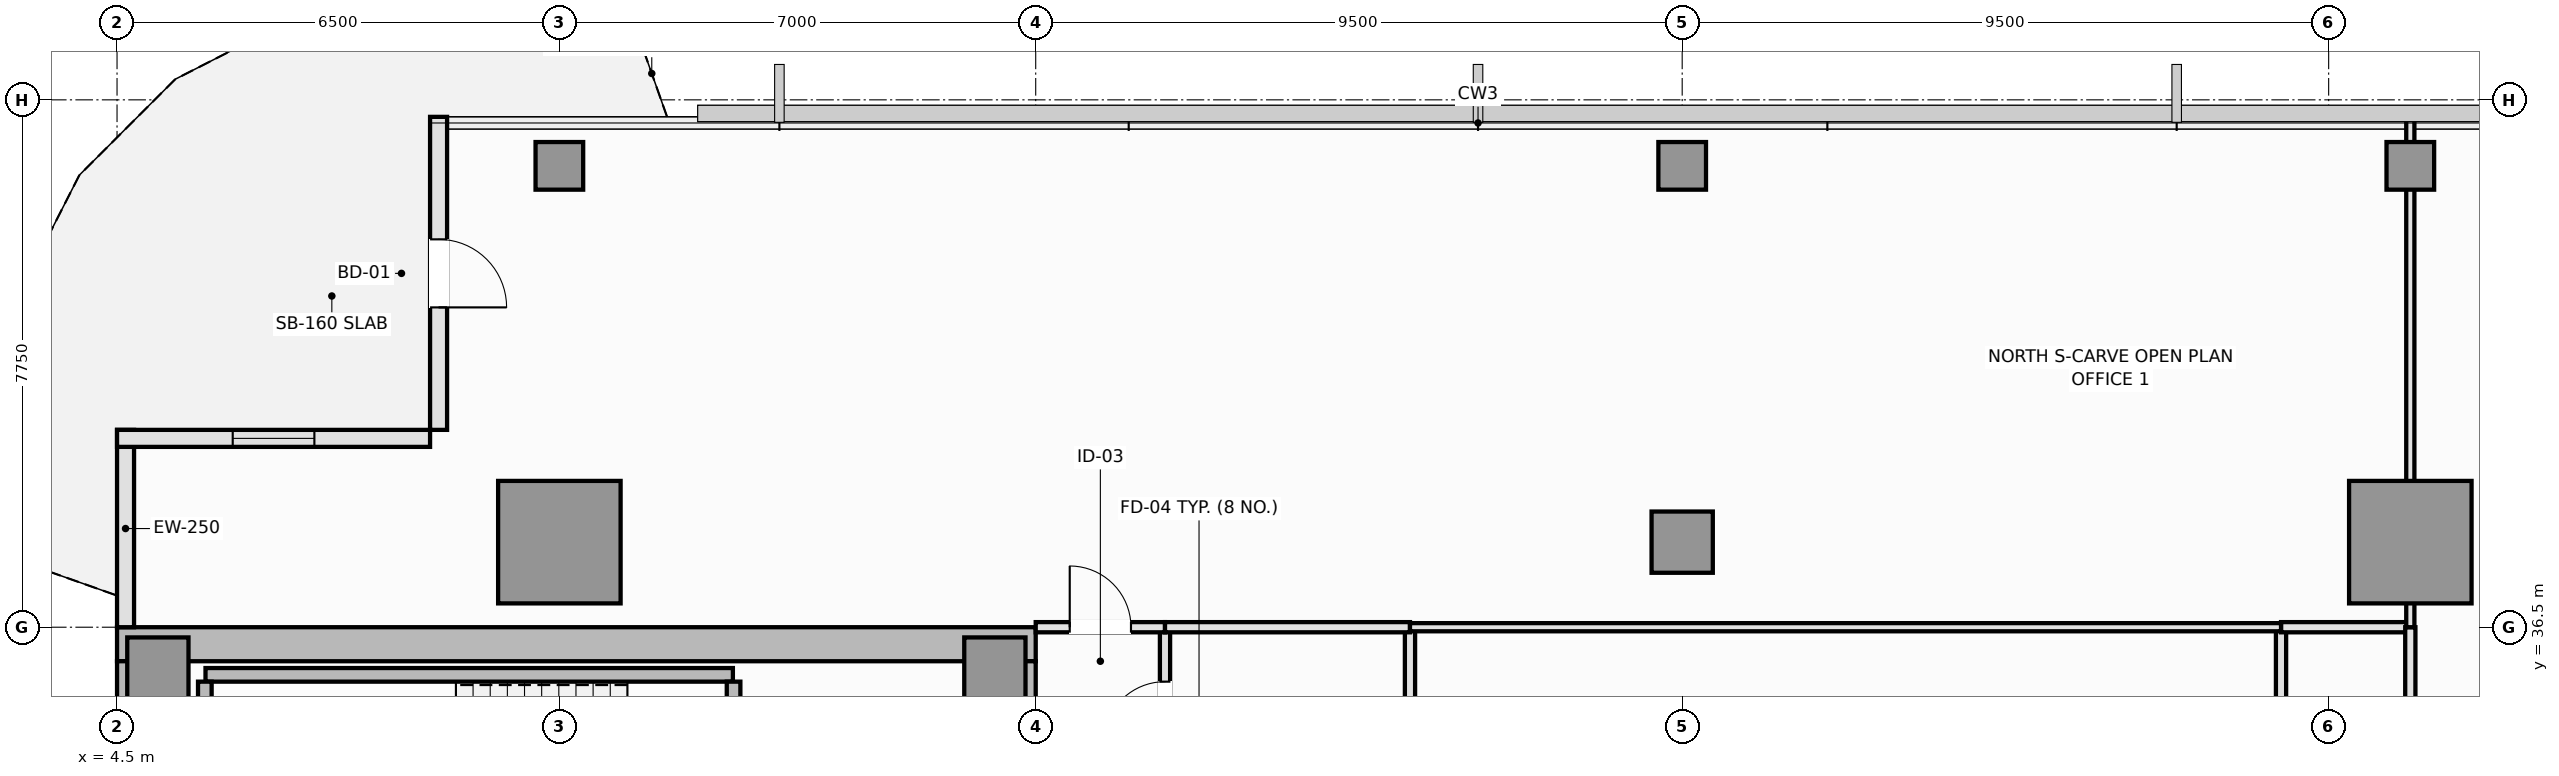
"""IFC4 building model, lengths in metres.
Left out: names, types, materials, properties, quantities, classifications, styles, units other than length and angle.
Written with IfcOpenShell. Run it as: python <this file> out.ifc"""

import sys

from ifc_helpers import new_model, si_unit, direction, frame, frame_2d, origin, origin_2d, place, context, subcontext, project, spatial, rectangle, extrude, element, fill, save


model = new_model("IFC4")
c1 = context("Model", 3, precision=1e-05, world=origin(), true_north=direction((0.0, 1.0)))
c2 = subcontext(c1, "Body", "Model", "MODEL_VIEW")
j1 = project(units=[si_unit("LENGTHUNIT", "METRE"), si_unit("PLANEANGLEUNIT", "RADIAN")], contexts=[c1])
p1 = place(None, origin())
s1 = spatial("IfcSite", under=j1, at=p1, CompositionType="ELEMENT")
p2 = place(p1, origin())
s2 = spatial("IfcBuilding", under=s1, at=p2, CompositionType="ELEMENT")
p3 = place(p2, frame((0.0, 0.0, 270.55)))
s3 = spatial("IfcBuildingStorey", under=s2, at=p3, CompositionType="ELEMENT", Elevation=270.55)
p4 = place(p3, frame((4.5, 36.25, 0.0), z_axis=(0.0, 0.0, 1.0), x_axis=(1.0, 0.0, 0.0)))
e1 = element("IfcWall", 1, at=p4, inside=s3, PredefinedType="SHEAR", context=c2, shape_type="SweptSolid", body=[
    extrude(rectangle(XDim=13.5, YDim=0.5, at=frame_2d((6.75, 0.0))), origin(), (0.0, 0.0, 1.0), 3.55),
])
p5 = place(p3, frame((4.75, 14.5, 0.0), z_axis=(0.0, 0.0, 1.0), x_axis=(0.0, 1.0, 0.0)))
e2 = element("IfcWall", 2, at=p5, inside=s3, PredefinedType="SHEAR", context=c2, shape_type="SweptSolid", body=[
    extrude(rectangle(XDim=21.5, YDim=0.5, at=frame_2d((10.75, 0.0))), origin(), (0.0, 0.0, 1.0), 3.55),
])
p6 = place(p3, frame((17.75, 27.05, 0.0), z_axis=(0.0, 0.0, 1.0), x_axis=(0.0, 1.0, 0.0)))
e3 = element("IfcWall", 3, at=p6, inside=s3, PredefinedType="SHEAR", context=c2, shape_type="SweptSolid", body=[
    extrude(rectangle(XDim=8.95, YDim=0.5, at=frame_2d((4.475, 0.0))), origin(), (0.0, 0.0, 1.0), 3.55),
])
p7 = place(p6, frame((3.45, 0.0, 0.0)))
e4 = element("IfcOpeningElement", 4, at=p7, cuts=e3, PredefinedType="OPENING", context=c2, shape_type="SweptSolid", body=[
    extrude(rectangle(XDim=1.1, YDim=2.15, at=frame_2d((0.55, 1.075))), frame((0.0, 0.26, 0.0), z_axis=(0.0, -1.0, 0.0), x_axis=(1.0, 0.0, 0.0)), (0.0, 0.0, 1.0), 0.52),
])
for number, where, z_axis, x_axis in (
    (5, (5.1, 35.9, 0.0), (0.0, 0.0, 1.0), (1.0, 0.0, 0.0)),
    (6, (17.4, 35.9, 0.0), (0.0, 0.0, 1.0), (1.0, 0.0, 0.0)),
):
    element("IfcColumn", number, at=place(p3, frame(where, z_axis=z_axis, x_axis=x_axis)), inside=s3, PredefinedType="PILASTER", context=c2, shape_type="SweptSolid", body=[
        extrude(rectangle(XDim=0.9, YDim=0.9, at=origin_2d()), origin(), (0.0, 0.0, 1.0), 3.55),
    ])
for number, where, z_axis, x_axis in (
    (7, (11.0, 37.75, 0.0), (0.0, 0.0, 1.0), (1.0, 0.0, 0.0)),
    (8, (38.2, 37.75, 0.0), (0.0, 0.0, 1.0), (1.0, 0.0, 0.0)),
):
    element("IfcColumn", number, at=place(p3, frame(where, z_axis=z_axis, x_axis=x_axis)), inside=s3, PredefinedType="COLUMN", context=c2, shape_type="SweptSolid", body=[
        extrude(rectangle(XDim=1.8, YDim=1.8, at=origin_2d()), origin(), (0.0, 0.0, 1.0), 3.55),
    ])
p8 = place(p3, frame((27.5, 37.75, 0.0), z_axis=(0.0, 0.0, 1.0), x_axis=(1.0, 0.0, 0.0)))
e9 = element("IfcColumn", 9, at=p8, inside=s3, PredefinedType="COLUMN", context=c2, shape_type="SweptSolid", body=[
    extrude(rectangle(XDim=0.9, YDim=0.9, at=origin_2d()), origin(), (0.0, 0.0, 1.0), 3.55),
])
for number, where, z_axis, x_axis in (
    (10, (11.0, 43.28, 0.0), (0.0, 0.0, 1.0), (1.0, 0.0, 0.0)),
    (11, (27.5, 43.28, 0.0), (0.0, 0.0, 1.0), (1.0, 0.0, 0.0)),
    (12, (38.2, 43.28, 0.0), (0.0, 0.0, 1.0), (1.0, 0.0, 0.0)),
):
    element("IfcColumn", number, at=place(p3, frame(where, z_axis=z_axis, x_axis=x_axis)), inside=s3, PredefinedType="COLUMN", context=c2, shape_type="SweptSolid", body=[
        extrude(rectangle(XDim=0.7, YDim=0.7, at=origin_2d()), origin(), (0.0, 0.0, 1.0), 3.55),
    ])
p9 = place(p3, frame((4.625, 39.4, 0.0), z_axis=(0.0, 0.0, 1.0), x_axis=(0.0, -1.0, 0.0)))
e13 = element("IfcWall", 13, at=p9, inside=s3, PredefinedType="SOLIDWALL", context=c2, shape_type="SweptSolid", body=[
    extrude(rectangle(XDim=2.9, YDim=0.25, at=frame_2d((1.45, 0.0))), origin(), (0.0, 0.0, 1.0), 3.39),
])
p10 = place(p3, frame((9.225, 44.0, 0.0), z_axis=(0.0, 0.0, 1.0), x_axis=(0.0, -1.0, 0.0)))
e14 = element("IfcWall", 14, at=p10, inside=s3, PredefinedType="SOLIDWALL", context=c2, shape_type="SweptSolid", body=[
    extrude(rectangle(XDim=4.6, YDim=0.25, at=frame_2d((2.3, 0.0))), origin(), (0.0, 0.0, 1.0), 3.39),
])
p11 = place(p10, frame((1.8, 0.0, 0.0)))
e15 = element("IfcOpeningElement", 15, at=p11, cuts=e14, PredefinedType="OPENING", context=c2, shape_type="SweptSolid", body=[
    extrude(rectangle(XDim=1.0, YDim=2.2, at=frame_2d((0.5, 1.1))), frame((0.0, 0.135, 0.0), z_axis=(0.0, -1.0, 0.0), x_axis=(1.0, 0.0, 0.0)), (0.0, 0.0, 1.0), 0.27),
])
p12 = place(p3, frame((9.1, 39.275, 0.0), z_axis=(0.0, 0.0, 1.0), x_axis=(-1.0, 0.0, 0.0)))
e16 = element("IfcWall", 16, at=p12, inside=s3, PredefinedType="SOLIDWALL", context=c2, shape_type="SweptSolid", body=[
    extrude(rectangle(XDim=4.6, YDim=0.25, at=frame_2d((2.3, 0.0))), origin(), (0.0, 0.0, 1.0), 3.12),
])
p13 = place(p12, frame((1.7, 0.0, 0.9)))
e17 = element("IfcOpeningElement", 17, at=p13, cuts=e16, PredefinedType="OPENING", context=c2, shape_type="SweptSolid", body=[
    extrude(rectangle(XDim=1.2, YDim=1.8, at=frame_2d((0.6, 0.9))), frame((0.0, 0.135, 0.0), z_axis=(0.0, -1.0, 0.0), x_axis=(1.0, 0.0, 0.0)), (0.0, 0.0, 1.0), 0.27),
])
p14 = place(p3, frame((5.8, 35.8, 0.0), z_axis=(0.0, 0.0, 1.0), x_axis=(1.0, 0.0, 0.0)))
e18 = element("IfcWall", 18, at=p14, inside=s3, PredefinedType="SOLIDWALL", context=c2, shape_type="SweptSolid", body=[
    extrude(rectangle(XDim=7.75, YDim=0.2, at=frame_2d((3.875, 0.0))), origin(), (0.0, 0.0, 1.0), 3.55),
])
p15 = place(p3, frame((5.79, 32.65, 0.0), z_axis=(0.0, 0.0, 1.0), x_axis=(0.0, 1.0, 0.0)))
e19 = element("IfcWall", 19, at=p15, inside=s3, PredefinedType="SOLIDWALL", context=c2, shape_type="SweptSolid", body=[
    extrude(rectangle(XDim=3.05, YDim=0.2, at=frame_2d((1.525, 0.0))), origin(), (0.0, 0.0, 1.0), 3.55),
])
p16 = place(p3, frame((13.56, 32.65, 0.0), z_axis=(0.0, 0.0, 1.0), x_axis=(0.0, 1.0, 0.0)))
e20 = element("IfcWall", 20, at=p16, inside=s3, PredefinedType="SOLIDWALL", context=c2, shape_type="SweptSolid", body=[
    extrude(rectangle(XDim=3.05, YDim=0.2, at=frame_2d((1.525, 0.0))), origin(), (0.0, 0.0, 1.0), 3.55),
])
p17 = place(p16, frame((0.95, 0.0, 0.0)))
e21 = element("IfcOpeningElement", 21, at=p17, cuts=e20, PredefinedType="OPENING", context=c2, shape_type="SweptSolid", body=[
    extrude(rectangle(XDim=1.15, YDim=2.15, at=frame_2d((0.575, 1.075))), frame((0.0, 0.11, 0.0), z_axis=(0.0, -1.0, 0.0), x_axis=(1.0, 0.0, 0.0)), (0.0, 0.0, 1.0), 0.22),
])
p18 = place(p3, frame((19.9, 34.0, 0.0), z_axis=(0.0, 0.0, 1.0), x_axis=(0.0, 1.0, 0.0)))
e22 = element("IfcWall", 22, at=p18, inside=s3, PredefinedType="PLUMBINGWALL", context=c2, shape_type="SweptSolid", body=[
    extrude(rectangle(XDim=2.5, YDim=0.15, at=frame_2d((1.25, 0.0))), origin(), (0.0, 0.0, 1.0), 3.39),
])
p19 = place(p18, frame((0.8, 0.0, 0.0)))
e23 = element("IfcOpeningElement", 23, at=p19, cuts=e22, PredefinedType="OPENING", context=c2, shape_type="SweptSolid", body=[
    extrude(rectangle(XDim=0.9, YDim=2.1, at=frame_2d((0.45, 1.05))), frame((0.0, 0.085, 0.0), z_axis=(0.0, -1.0, 0.0), x_axis=(1.0, 0.0, 0.0)), (0.0, 0.0, 1.0), 0.17),
])
p20 = place(p3, frame((18.0, 36.5, 0.0), z_axis=(0.0, 0.0, 1.0), x_axis=(1.0, 0.0, 0.0)))
e24 = element("IfcWall", 24, at=p20, inside=s3, PredefinedType="PARTITIONING", context=c2, shape_type="SweptSolid", body=[
    extrude(rectangle(XDim=1.9, YDim=0.15, at=frame_2d((0.95, 0.0))), origin(), (0.0, 0.0, 1.0), 3.39),
])
p21 = place(p20, frame((0.5, 0.0, 0.0)))
e25 = element("IfcOpeningElement", 25, at=p21, cuts=e24, PredefinedType="OPENING", context=c2, shape_type="SweptSolid", body=[
    extrude(rectangle(XDim=0.9, YDim=2.1, at=frame_2d((0.45, 1.05))), frame((0.0, 0.085, 0.0), z_axis=(0.0, -1.0, 0.0), x_axis=(1.0, 0.0, 0.0)), (0.0, 0.0, 1.0), 0.17),
])
p22 = place(p3, frame((36.3, 32.7, 0.0), z_axis=(0.0, 0.0, 1.0), x_axis=(0.0, 1.0, 0.0)))
e26 = element("IfcWall", 26, at=p22, inside=s3, PredefinedType="PARTITIONING", context=c2, shape_type="SweptSolid", body=[
    extrude(rectangle(XDim=3.8, YDim=0.15, at=frame_2d((1.9, 0.0))), origin(), (0.0, 0.0, 1.0), 3.39),
])
p23 = place(p22, frame((1.4, 0.0, 0.0)))
e27 = element("IfcOpeningElement", 27, at=p23, cuts=e26, PredefinedType="OPENING", context=c2, shape_type="SweptSolid", body=[
    extrude(rectangle(XDim=1.0, YDim=2.15, at=frame_2d((0.5, 1.075))), frame((0.0, 0.085, 0.0), z_axis=(0.0, -1.0, 0.0), x_axis=(1.0, 0.0, 0.0)), (0.0, 0.0, 1.0), 0.17),
])
p24 = place(p3, frame((36.3, 36.5, 0.0), z_axis=(0.0, 0.0, 1.0), x_axis=(1.0, 0.0, 0.0)))
e28 = element("IfcWall", 28, at=p24, inside=s3, PredefinedType="PARTITIONING", context=c2, shape_type="SweptSolid", body=[
    extrude(rectangle(XDim=1.9, YDim=0.15, at=frame_2d((0.95, 0.0))), origin(), (0.0, 0.0, 1.0), 3.39),
])
p25 = place(p3, frame((38.2, 28.9, 0.0), z_axis=(0.0, 0.0, 1.0), x_axis=(0.0, 1.0, 0.0)))
e29 = element("IfcWall", 29, at=p25, inside=s3, PredefinedType="PARTITIONING", context=c2, shape_type="SweptSolid", body=[
    extrude(rectangle(XDim=7.6, YDim=0.15, at=frame_2d((3.8, 0.0))), origin(), (0.0, 0.0, 1.0), 2.99),
])
p26 = place(p25, frame((3.894, 0.0, 0.0)))
e30 = element("IfcOpeningElement", 30, at=p26, cuts=e29, PredefinedType="OPENING", context=c2, shape_type="SweptSolid", body=[
    extrude(rectangle(XDim=1.0, YDim=2.15, at=frame_2d((0.5, 1.075))), frame((0.0, 0.085, 0.0), z_axis=(0.0, -1.0, 0.0), x_axis=(1.0, 0.0, 0.0)), (0.0, 0.0, 1.0), 0.17),
])
p27 = place(p3, frame((23.5, 34.0, 0.0), z_axis=(0.0, 0.0, 1.0), x_axis=(0.0, 1.0, 0.0)))
e31 = element("IfcWall", 31, at=p27, inside=s3, PredefinedType="PLUMBINGWALL", context=c2, shape_type="SweptSolid", body=[
    extrude(rectangle(XDim=2.5, YDim=0.15, at=frame_2d((1.25, 0.0))), origin(), (0.0, 0.0, 1.0), 3.39),
])
p28 = place(p3, frame((19.9, 36.5, 0.0), z_axis=(0.0, 0.0, 1.0), x_axis=(1.0, 0.0, 0.0)))
e32 = element("IfcWall", 32, at=p28, inside=s3, PredefinedType="PLUMBINGWALL", context=c2, shape_type="SweptSolid", body=[
    extrude(rectangle(XDim=3.6, YDim=0.15, at=frame_2d((1.8, 0.0))), origin(), (0.0, 0.0, 1.0), 3.39),
])
p29 = place(p3, frame((23.5, 36.5, 0.0), z_axis=(0.0, 0.0, 1.0), x_axis=(1.0, 0.0, 0.0)))
e33 = element("IfcWall", 33, at=p29, inside=s3, PredefinedType="PARTITIONING", context=c2, shape_type="SweptSolid", body=[
    extrude(rectangle(XDim=12.8, YDim=0.12, at=frame_2d((6.4, 0.0))), origin(), (0.0, 0.0, 1.0), 3.39),
])
p30 = place(p3, frame((38.2, 36.5, 0.0), z_axis=(0.0, 0.0, 1.0), x_axis=(0.0, 1.0, 0.0)))
e34 = element("IfcWall", 34, at=p30, inside=s3, PredefinedType="PARTITIONING", context=c2, shape_type="SweptSolid", body=[
    extrude(rectangle(XDim=7.49, YDim=0.12, at=frame_2d((3.745, 0.0))), origin(), (0.0, 0.0, 1.0), 2.99),
])
p31 = place(p11, frame((1.0, 0.0, 0.0), z_axis=(0.0, 0.0, 1.0), x_axis=(-1.0, 0.0, 0.0)))
e35 = element("IfcDoor", 35, at=p31, inside=s3, OperationType="SINGLE_SWING_RIGHT", PredefinedType="DOOR", context=c2, shape_type="SweptSolid", body=[
    extrude(rectangle(XDim=1.0, YDim=2.2, at=frame_2d((0.5, 1.1))), frame((0.0, 0.025, 0.0), z_axis=(0.0, -1.0, 0.0), x_axis=(1.0, 0.0, 0.0)), (0.0, 0.0, 1.0), 0.05),
])
fill(e15, e35)
p32 = place(p13, origin())
e36 = element("IfcWindow", 36, at=p32, inside=s3, PartitioningType="SINGLE_PANEL", PredefinedType="WINDOW", context=c2, shape_type="SweptSolid", body=[
    extrude(rectangle(XDim=1.2, YDim=1.8, at=frame_2d((0.6, 0.9))), frame((0.0, 0.03, 0.0), z_axis=(0.0, -1.0, 0.0), x_axis=(1.0, 0.0, 0.0)), (0.0, 0.0, 1.0), 0.06),
])
fill(e17, e36)
p33 = place(p19, origin())
e37 = element("IfcDoor", 37, at=p33, inside=s3, OperationType="SINGLE_SWING_LEFT", PredefinedType="DOOR", context=c2, shape_type="SweptSolid", body=[
    extrude(rectangle(XDim=0.9, YDim=2.1, at=frame_2d((0.45, 1.05))), frame((0.0, 0.025, 0.0), z_axis=(0.0, -1.0, 0.0), x_axis=(1.0, 0.0, 0.0)), (0.0, 0.0, 1.0), 0.05),
])
fill(e23, e37)
p34 = place(p21, origin())
e38 = element("IfcDoor", 38, at=p34, inside=s3, OperationType="SINGLE_SWING_LEFT", PredefinedType="DOOR", context=c2, shape_type="SweptSolid", body=[
    extrude(rectangle(XDim=0.9, YDim=2.1, at=frame_2d((0.45, 1.05))), frame((0.0, 0.025, 0.0), z_axis=(0.0, -1.0, 0.0), x_axis=(1.0, 0.0, 0.0)), (0.0, 0.0, 1.0), 0.05),
])
fill(e25, e38)
save(model, sys.argv[1])
